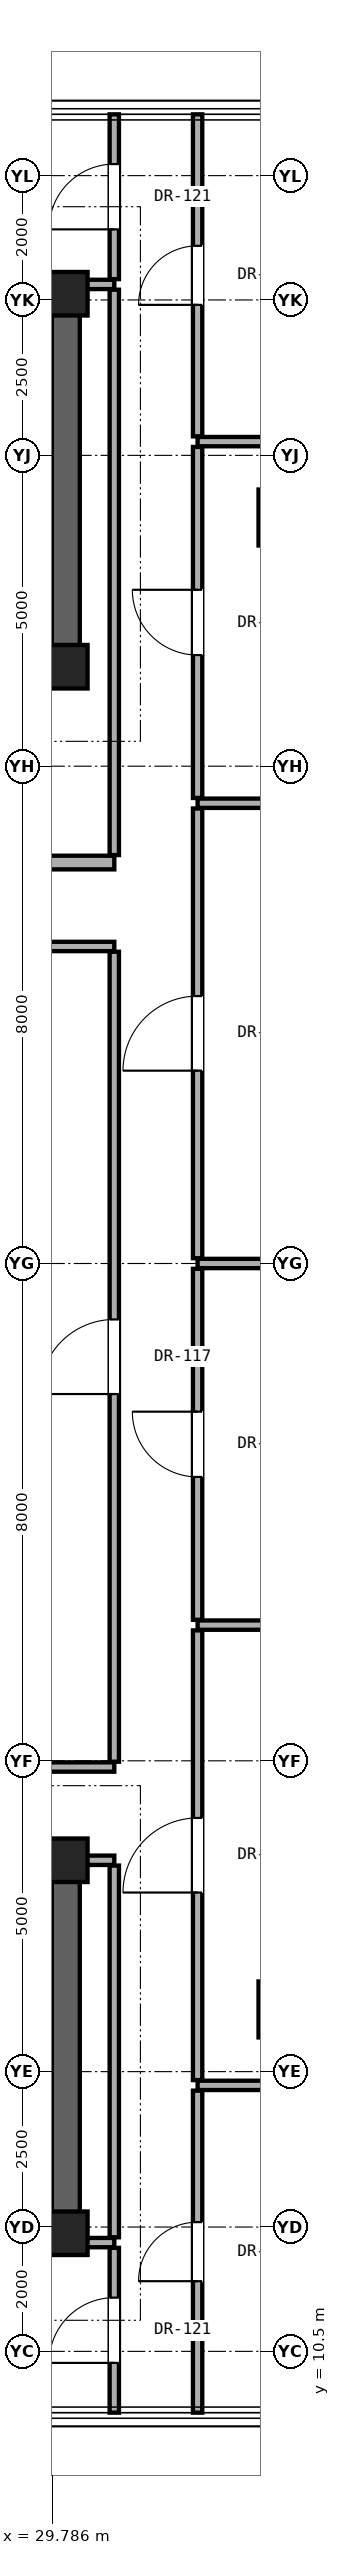
"""IFC4 building model, lengths in metres.
Left out: names, types, materials, properties, quantities, classifications, styles, units other than length and angle.
Written with IfcOpenShell. Run it as: python <this file> out.ifc"""

import sys

from ifc_helpers import new_model, si_unit, direction, frame, frame_2d, origin, origin_2d, place, context, subcontext, project, spatial, rectangle, extrude, element, fill, save


model = new_model("IFC4")
c1 = context("Model", 3, precision=1e-05, world=origin(), true_north=direction((0.0, 1.0)))
c2 = subcontext(c1, "Body", "Model", "MODEL_VIEW")
j1 = project(units=[si_unit("LENGTHUNIT", "METRE"), si_unit("PLANEANGLEUNIT", "RADIAN")], contexts=[c1])
p1 = place(None, origin())
s1 = spatial("IfcSite", under=j1, at=p1, CompositionType="ELEMENT")
p2 = place(p1, origin())
s2 = spatial("IfcBuilding", under=s1, at=p2, CompositionType="ELEMENT")
p3 = place(p2, frame((0.0, 0.0, 256.3)))
s3 = spatial("IfcBuildingStorey", under=s2, at=p3, CompositionType="ELEMENT", Elevation=256.3)
for number, where, z_axis, x_axis in (
    (1, (30.0, 12.4, 0.0), (0.0, 0.0, 1.0), (1.0, 0.0, 0.0)),
    (2, (30.0, 18.4, 0.0), (0.0, 0.0, 1.0), (1.0, 0.0, 0.0)),
    (3, (30.0, 37.6, 0.0), (0.0, 0.0, 1.0), (1.0, 0.0, 0.0)),
    (4, (30.0, 43.6, 0.0), (0.0, 0.0, 1.0), (1.0, 0.0, 0.0)),
):
    element("IfcColumn", number, at=place(p3, frame(where, z_axis=z_axis, x_axis=x_axis)), inside=s3, PredefinedType="COLUMN", context=c2, shape_type="SweptSolid", body=[
        extrude(rectangle(XDim=0.7, YDim=0.7, at=origin_2d()), origin(), (0.0, 0.0, 1.0), 3.6),
    ])
for number, where, z_axis, x_axis in (
    (5, (33.4, 16.0, 0.0), (0.0, 0.0, 1.0), (1.0, 0.0, 0.0)),
    (6, (33.4, 40.0, 0.0), (0.0, 0.0, 1.0), (1.0, 0.0, 0.0)),
):
    element("IfcColumn", number, at=place(p3, frame(where, z_axis=z_axis, x_axis=x_axis)), inside=s3, PredefinedType="PILASTER", context=c2, shape_type="SweptSolid", body=[
        extrude(rectangle(XDim=0.6, YDim=0.9, at=origin_2d()), origin(), (0.0, 0.0, 1.0), 3.6),
    ])
p4 = place(p3, frame((11.0, 43.6, 0.0), z_axis=(0.0, 0.0, 1.0), x_axis=(1.0, 0.0, 0.0)))
e7 = element("IfcWall", 7, at=p4, inside=s3, PredefinedType="SHEAR", context=c2, shape_type="SweptSolid", body=[
    extrude(rectangle(XDim=19.0, YDim=0.45, at=frame_2d((9.5, 0.0))), origin(), (0.0, 0.0, 1.0), 3.4),
])
p5 = place(p3, frame((30.0, 37.6, 0.0), z_axis=(0.0, 0.0, 1.0), x_axis=(0.0, 1.0, 0.0)))
e8 = element("IfcWall", 8, at=p5, inside=s3, PredefinedType="SHEAR", context=c2, shape_type="SweptSolid", body=[
    extrude(rectangle(XDim=6.0, YDim=0.45, at=frame_2d((3.0, 0.0))), origin(), (0.0, 0.0, 1.0), 3.4),
])
p6 = place(p3, frame((11.0, 37.6, 0.0), z_axis=(0.0, 0.0, 1.0), x_axis=(1.0, 0.0, 0.0)))
e9 = element("IfcWall", 9, at=p6, inside=s3, PredefinedType="SHEAR", context=c2, shape_type="SweptSolid", body=[
    extrude(rectangle(XDim=19.0, YDim=0.45, at=frame_2d((9.5, 0.0))), origin(), (0.0, 0.0, 1.0), 3.4),
])
p7 = place(p6, frame((1.06, 0.0, 0.0)))
e10 = element("IfcOpeningElement", 10, at=p7, cuts=e9, PredefinedType="OPENING", context=c2, shape_type="SweptSolid", body=[
    extrude(rectangle(XDim=1.15, YDim=2.2, at=frame_2d((0.575, 1.1))), frame((0.0, 0.235, 0.0), z_axis=(0.0, -1.0, 0.0), x_axis=(1.0, 0.0, 0.0)), (0.0, 0.0, 1.0), 0.47),
])
p8 = place(p6, frame((9.55, 0.0, 0.0)))
e11 = element("IfcOpeningElement", 11, at=p8, cuts=e9, PredefinedType="OPENING", context=c2, shape_type="SweptSolid", body=[
    extrude(rectangle(XDim=1.4, YDim=2.35, at=frame_2d((0.7, 1.175))), frame((0.0, 0.235, 0.0), z_axis=(0.0, -1.0, 0.0), x_axis=(1.0, 0.0, 0.0)), (0.0, 0.0, 1.0), 0.47),
])
p9 = place(p6, frame((11.95, 0.0, 0.0)))
e12 = element("IfcOpeningElement", 12, at=p9, cuts=e9, PredefinedType="OPENING", context=c2, shape_type="SweptSolid", body=[
    extrude(rectangle(XDim=1.4, YDim=2.35, at=frame_2d((0.7, 1.175))), frame((0.0, 0.235, 0.0), z_axis=(0.0, -1.0, 0.0), x_axis=(1.0, 0.0, 0.0)), (0.0, 0.0, 1.0), 0.47),
])
p10 = place(p3, frame((11.0, 12.4, 0.0), z_axis=(0.0, 0.0, 1.0), x_axis=(1.0, 0.0, 0.0)))
e13 = element("IfcWall", 13, at=p10, inside=s3, PredefinedType="SHEAR", context=c2, shape_type="SweptSolid", body=[
    extrude(rectangle(XDim=19.0, YDim=0.45, at=frame_2d((9.5, 0.0))), origin(), (0.0, 0.0, 1.0), 3.4),
])
p11 = place(p3, frame((30.0, 12.4, 0.0), z_axis=(0.0, 0.0, 1.0), x_axis=(0.0, 1.0, 0.0)))
e14 = element("IfcWall", 14, at=p11, inside=s3, PredefinedType="SHEAR", context=c2, shape_type="SweptSolid", body=[
    extrude(rectangle(XDim=6.0, YDim=0.45, at=frame_2d((3.0, 0.0))), origin(), (0.0, 0.0, 1.0), 3.4),
])
p12 = place(p3, frame((11.0, 18.4, 0.0), z_axis=(0.0, 0.0, 1.0), x_axis=(1.0, 0.0, 0.0)))
e15 = element("IfcWall", 15, at=p12, inside=s3, PredefinedType="SHEAR", context=c2, shape_type="SweptSolid", body=[
    extrude(rectangle(XDim=19.0, YDim=0.45, at=frame_2d((9.5, 0.0))), origin(), (0.0, 0.0, 1.0), 3.4),
])
p13 = place(p12, frame((4.175, 0.0, 0.0)))
e16 = element("IfcOpeningElement", 16, at=p13, cuts=e15, PredefinedType="OPENING", context=c2, shape_type="SweptSolid", body=[
    extrude(rectangle(XDim=1.2, YDim=2.25, at=frame_2d((0.6, 1.125))), frame((0.0, 0.235, 0.0), z_axis=(0.0, -1.0, 0.0), x_axis=(1.0, 0.0, 0.0)), (0.0, 0.0, 1.0), 0.47),
])
p14 = place(p12, frame((11.075, 0.0, 0.0)))
e17 = element("IfcOpeningElement", 17, at=p14, cuts=e15, PredefinedType="OPENING", context=c2, shape_type="SweptSolid", body=[
    extrude(rectangle(XDim=0.95, YDim=2.15, at=frame_2d((0.475, 1.075))), frame((0.0, 0.235, 0.0), z_axis=(0.0, -1.0, 0.0), x_axis=(1.0, 0.0, 0.0)), (0.0, 0.0, 1.0), 0.47),
])
p15 = place(p12, frame((14.3, 0.0, 0.0)))
e18 = element("IfcOpeningElement", 18, at=p15, cuts=e15, PredefinedType="OPENING", context=c2, shape_type="SweptSolid", body=[
    extrude(rectangle(XDim=1.3, YDim=2.3, at=frame_2d((0.65, 1.15))), frame((0.0, 0.235, 0.0), z_axis=(0.0, -1.0, 0.0), x_axis=(1.0, 0.0, 0.0)), (0.0, 0.0, 1.0), 0.47),
])
p16 = place(p12, frame((16.6, 0.0, 0.0)))
e19 = element("IfcOpeningElement", 19, at=p16, cuts=e15, PredefinedType="OPENING", context=c2, shape_type="SweptSolid", body=[
    extrude(rectangle(XDim=1.3, YDim=2.3, at=frame_2d((0.65, 1.15))), frame((0.0, 0.235, 0.0), z_axis=(0.0, -1.0, 0.0), x_axis=(1.0, 0.0, 0.0)), (0.0, 0.0, 1.0), 0.47),
])
p17 = place(p3, frame((30.22, 12.25, 0.0), z_axis=(0.0, 0.0, 1.0), x_axis=(1.0, 0.0, 0.0)))
e20 = element("IfcWall", 20, at=p17, inside=s3, PredefinedType="PARTITIONING", context=c2, shape_type="SweptSolid", body=[
    extrude(rectangle(XDim=0.56, YDim=0.15, at=frame_2d((0.28, 0.0))), origin(), (0.0, 0.0, 1.0), 3.4),
])
p18 = place(p3, frame((32.12, 14.779, 0.0), z_axis=(0.0, 0.0, 1.0), x_axis=(1.0, 0.0, 0.0)))
e21 = element("IfcWall", 21, at=p18, inside=s3, PredefinedType="PARTITIONING", context=c2, shape_type="SweptSolid", body=[
    extrude(rectangle(XDim=3.485, YDim=0.15, at=frame_2d((1.742, 0.0))), origin(), (0.0, 0.0, 1.0), 3.4),
])
p19 = place(p3, frame((30.22, 18.4, 0.0), z_axis=(0.0, 0.0, 1.0), x_axis=(1.0, 0.0, 0.0)))
e22 = element("IfcWall", 22, at=p19, inside=s3, PredefinedType="PARTITIONING", context=c2, shape_type="SweptSolid", body=[
    extrude(rectangle(XDim=0.56, YDim=0.15, at=frame_2d((0.28, 0.0))), origin(), (0.0, 0.0, 1.0), 2.792),
])
p20 = place(p3, frame((10.22, 19.9, 0.0), z_axis=(0.0, 0.0, 1.0), x_axis=(1.0, 0.0, 0.0)))
e23 = element("IfcWall", 23, at=p20, inside=s3, PredefinedType="PARTITIONING", context=c2, shape_type="SweptSolid", body=[
    extrude(rectangle(XDim=20.56, YDim=0.15, at=frame_2d((10.28, 0.0))), origin(), (0.0, 0.0, 1.0), 2.536),
])
p21 = place(p20, frame((1.36, 0.0, 0.0)))
e24 = element("IfcOpeningElement", 24, at=p21, cuts=e23, PredefinedType="OPENING", context=c2, shape_type="SweptSolid", body=[
    extrude(rectangle(XDim=0.9, YDim=2.1, at=frame_2d((0.45, 1.05))), frame((0.0, 0.085, 0.0), z_axis=(0.0, -1.0, 0.0), x_axis=(1.0, 0.0, 0.0)), (0.0, 0.0, 1.0), 0.17),
])
p22 = place(p20, frame((9.68, 0.0, 0.0)))
e25 = element("IfcOpeningElement", 25, at=p22, cuts=e23, PredefinedType="OPENING", context=c2, shape_type="SweptSolid", body=[
    extrude(rectangle(XDim=1.2, YDim=2.25, at=frame_2d((0.6, 1.125))), frame((0.0, 0.085, 0.0), z_axis=(0.0, -1.0, 0.0), x_axis=(1.0, 0.0, 0.0)), (0.0, 0.0, 1.0), 0.17),
])
for number, where, z_axis, x_axis in (
    (26, (32.12, 22.183, 0.0), (0.0, 0.0, 1.0), (1.0, 0.0, 0.0)),
    (27, (32.12, 28.0, 0.0), (0.0, 0.0, 1.0), (1.0, 0.0, 0.0)),
):
    element("IfcWall", number, at=place(p3, frame(where, z_axis=z_axis, x_axis=x_axis)), inside=s3, PredefinedType="PARTITIONING", context=c2, shape_type="SweptSolid", body=[
        extrude(rectangle(XDim=8.77, YDim=0.15, at=frame_2d((4.385, 0.0))), origin(), (0.0, 0.0, 1.0), 2.619),
    ])
p23 = place(p3, frame((10.22, 33.1, 0.0), z_axis=(0.0, 0.0, 1.0), x_axis=(1.0, 0.0, 0.0)))
e28 = element("IfcWall", 28, at=p23, inside=s3, PredefinedType="PARTITIONING", context=c2, shape_type="SweptSolid", body=[
    extrude(rectangle(XDim=20.56, YDim=0.15, at=frame_2d((10.28, 0.0))), origin(), (0.0, 0.0, 1.0), 2.536),
])
p24 = place(p3, frame((15.59, 34.45, 0.0), z_axis=(0.0, 0.0, 1.0), x_axis=(1.0, 0.0, 0.0)))
e29 = element("IfcWall", 29, at=p24, inside=s3, PredefinedType="SOLIDWALL", context=c2, shape_type="SweptSolid", body=[
    extrude(rectangle(XDim=15.19, YDim=0.22, at=frame_2d((7.595, 0.0))), origin(), (0.0, 0.0, 1.0), 2.536),
])
p25 = place(p24, frame((6.26, 0.0, 0.0)))
e30 = element("IfcOpeningElement", 30, at=p25, cuts=e29, PredefinedType="OPENING", context=c2, shape_type="SweptSolid", body=[
    extrude(rectangle(XDim=1.2, YDim=2.25, at=frame_2d((0.6, 1.125))), frame((0.0, 0.12, 0.0), z_axis=(0.0, -1.0, 0.0), x_axis=(1.0, 0.0, 0.0)), (0.0, 0.0, 1.0), 0.24),
])
p26 = place(p24, frame((9.96, 0.0, 0.0)))
e31 = element("IfcOpeningElement", 31, at=p26, cuts=e29, PredefinedType="OPENING", context=c2, shape_type="SweptSolid", body=[
    extrude(rectangle(XDim=0.95, YDim=2.15, at=frame_2d((0.475, 1.075))), frame((0.0, 0.12, 0.0), z_axis=(0.0, -1.0, 0.0), x_axis=(1.0, 0.0, 0.0)), (0.0, 0.0, 1.0), 0.24),
])
p27 = place(p24, frame((12.21, 0.0, 0.0)))
e32 = element("IfcOpeningElement", 32, at=p27, cuts=e29, PredefinedType="OPENING", context=c2, shape_type="SweptSolid", body=[
    extrude(rectangle(XDim=0.95, YDim=2.15, at=frame_2d((0.475, 1.075))), frame((0.0, 0.12, 0.0), z_axis=(0.0, -1.0, 0.0), x_axis=(1.0, 0.0, 0.0)), (0.0, 0.0, 1.0), 0.24),
])
p28 = place(p24, frame((0.675, 0.0, 0.0)))
e33 = element("IfcOpeningElement", 33, at=p28, cuts=e29, PredefinedType="OPENING", context=c2, shape_type="SweptSolid", body=[
    extrude(rectangle(XDim=0.85, YDim=2.01, at=frame_2d((0.425, 1.005))), frame((0.0, 0.12, 0.0), z_axis=(0.0, -1.0, 0.0), x_axis=(1.0, 0.0, 0.0)), (0.0, 0.0, 1.0), 0.24),
])
p29 = place(p24, frame((2.835, 0.0, 0.0)))
e34 = element("IfcOpeningElement", 34, at=p29, cuts=e29, PredefinedType="OPENING", context=c2, shape_type="SweptSolid", body=[
    extrude(rectangle(XDim=0.85, YDim=2.01, at=frame_2d((0.425, 1.005))), frame((0.0, 0.12, 0.0), z_axis=(0.0, -1.0, 0.0), x_axis=(1.0, 0.0, 0.0)), (0.0, 0.0, 1.0), 0.24),
])
p30 = place(p3, frame((32.12, 35.404, 0.0), z_axis=(0.0, 0.0, 1.0), x_axis=(1.0, 0.0, 0.0)))
e35 = element("IfcWall", 35, at=p30, inside=s3, PredefinedType="PARTITIONING", context=c2, shape_type="SweptSolid", body=[
    extrude(rectangle(XDim=8.77, YDim=0.15, at=frame_2d((4.385, 0.0))), origin(), (0.0, 0.0, 1.0), 2.619),
])
p31 = place(p3, frame((32.12, 41.221, 0.0), z_axis=(0.0, 0.0, 1.0), x_axis=(1.0, 0.0, 0.0)))
e36 = element("IfcWall", 36, at=p31, inside=s3, PredefinedType="PARTITIONING", context=c2, shape_type="SweptSolid", body=[
    extrude(rectangle(XDim=3.485, YDim=0.15, at=frame_2d((1.742, 0.0))), origin(), (0.0, 0.0, 1.0), 3.4),
])
p32 = place(p3, frame((30.22, 43.75, 0.0), z_axis=(0.0, 0.0, 1.0), x_axis=(1.0, 0.0, 0.0)))
e37 = element("IfcWall", 37, at=p32, inside=s3, PredefinedType="PARTITIONING", context=c2, shape_type="SweptSolid", body=[
    extrude(rectangle(XDim=0.56, YDim=0.15, at=frame_2d((0.28, 0.0))), origin(), (0.0, 0.0, 1.0), 3.4),
])
p33 = place(p3, frame((30.78, 9.514, 0.0), z_axis=(0.0, 0.0, 1.0), x_axis=(0.0, 1.0, 0.0)))
e38 = element("IfcWall", 38, at=p33, inside=s3, PredefinedType="PARTITIONING", context=c2, shape_type="SweptSolid", body=[
    extrude(rectangle(XDim=2.651, YDim=0.15, at=frame_2d((1.326, 0.0))), origin(), (0.0, 0.0, 1.0), 3.4),
])
p34 = place(p33, frame((0.801, 0.0, 0.0)))
e39 = element("IfcOpeningElement", 39, at=p34, cuts=e38, PredefinedType="OPENING", context=c2, shape_type="SweptSolid", body=[
    extrude(rectangle(XDim=1.05, YDim=2.2, at=frame_2d((0.525, 1.1))), frame((0.0, 0.085, 0.0), z_axis=(0.0, -1.0, 0.0), x_axis=(1.0, 0.0, 0.0)), (0.0, 0.0, 1.0), 0.17),
])
p35 = place(p3, frame((30.78, 12.335, 0.0), z_axis=(0.0, 0.0, 1.0), x_axis=(0.0, 1.0, 0.0)))
e40 = element("IfcWall", 40, at=p35, inside=s3, PredefinedType="PARTITIONING", context=c2, shape_type="SweptSolid", body=[
    extrude(rectangle(XDim=5.98, YDim=0.15, at=frame_2d((2.99, 0.0))), origin(), (0.0, 0.0, 1.0), 2.792),
])
p36 = place(p3, frame((30.78, 19.985, 0.0), z_axis=(0.0, 0.0, 1.0), x_axis=(0.0, 1.0, 0.0)))
e41 = element("IfcWall", 41, at=p36, inside=s3, PredefinedType="PARTITIONING", context=c2, shape_type="SweptSolid", body=[
    extrude(rectangle(XDim=13.03, YDim=0.15, at=frame_2d((6.515, 0.0))), origin(), (0.0, 0.0, 1.0), 2.696),
])
p37 = place(p36, frame((5.915, 0.0, 0.0)))
e42 = element("IfcOpeningElement", 42, at=p37, cuts=e41, PredefinedType="OPENING", context=c2, shape_type="SweptSolid", body=[
    extrude(rectangle(XDim=1.2, YDim=2.25, at=frame_2d((0.6, 1.125))), frame((0.0, 0.085, 0.0), z_axis=(0.0, -1.0, 0.0), x_axis=(1.0, 0.0, 0.0)), (0.0, 0.0, 1.0), 0.17),
])
p38 = place(p3, frame((30.78, 34.57, 0.0), z_axis=(0.0, 0.0, 1.0), x_axis=(0.0, 1.0, 0.0)))
e43 = element("IfcWall", 43, at=p38, inside=s3, PredefinedType="PARTITIONING", context=c2, shape_type="SweptSolid", body=[
    extrude(rectangle(XDim=9.095, YDim=0.15, at=frame_2d((4.547, 0.0))), origin(), (0.0, 0.0, 1.0), 2.792),
])
p39 = place(p3, frame((30.78, 43.835, 0.0), z_axis=(0.0, 0.0, 1.0), x_axis=(0.0, 1.0, 0.0)))
e44 = element("IfcWall", 44, at=p39, inside=s3, PredefinedType="PARTITIONING", context=c2, shape_type="SweptSolid", body=[
    extrude(rectangle(XDim=2.651, YDim=0.15, at=frame_2d((1.326, 0.0))), origin(), (0.0, 0.0, 1.0), 3.4),
])
p40 = place(p39, frame((0.801, 0.0, 0.0)))
e45 = element("IfcOpeningElement", 45, at=p40, cuts=e44, PredefinedType="OPENING", context=c2, shape_type="SweptSolid", body=[
    extrude(rectangle(XDim=1.05, YDim=2.2, at=frame_2d((0.525, 1.1))), frame((0.0, 0.085, 0.0), z_axis=(0.0, -1.0, 0.0), x_axis=(1.0, 0.0, 0.0)), (0.0, 0.0, 1.0), 0.17),
])
p41 = place(p3, frame((32.12, 9.514, 0.0), z_axis=(0.0, 0.0, 1.0), x_axis=(0.0, 1.0, 0.0)))
e46 = element("IfcWall", 46, at=p41, inside=s3, PredefinedType="PARTITIONING", context=c2, shape_type="SweptSolid", body=[
    extrude(rectangle(XDim=5.18, YDim=0.15, at=frame_2d((2.59, 0.0))), origin(), (0.0, 0.0, 1.0), 3.4),
])
p42 = place(p41, frame((2.115, 0.0, 0.0)))
e47 = element("IfcOpeningElement", 47, at=p42, cuts=e46, PredefinedType="OPENING", context=c2, shape_type="SweptSolid", body=[
    extrude(rectangle(XDim=0.95, YDim=2.15, at=frame_2d((0.475, 1.075))), frame((0.0, 0.085, 0.0), z_axis=(0.0, -1.0, 0.0), x_axis=(1.0, 0.0, 0.0)), (0.0, 0.0, 1.0), 0.17),
])
p43 = place(p3, frame((32.12, 14.864, 0.0), z_axis=(0.0, 0.0, 1.0), x_axis=(0.0, 1.0, 0.0)))
e48 = element("IfcWall", 48, at=p43, inside=s3, PredefinedType="PARTITIONING", context=c2, shape_type="SweptSolid", body=[
    extrude(rectangle(XDim=7.234, YDim=0.15, at=frame_2d((3.617, 0.0))), origin(), (0.0, 0.0, 1.0), 2.792),
])
p44 = place(p43, frame((3.017, 0.0, 0.0)))
e49 = element("IfcOpeningElement", 49, at=p44, cuts=e48, PredefinedType="OPENING", context=c2, shape_type="SweptSolid", body=[
    extrude(rectangle(XDim=1.2, YDim=2.25, at=frame_2d((0.6, 1.125))), frame((0.0, 0.085, 0.0), z_axis=(0.0, -1.0, 0.0), x_axis=(1.0, 0.0, 0.0)), (0.0, 0.0, 1.0), 0.17),
])
p45 = place(p3, frame((32.12, 22.268, 0.0), z_axis=(0.0, 0.0, 1.0), x_axis=(0.0, 1.0, 0.0)))
e50 = element("IfcWall", 50, at=p45, inside=s3, PredefinedType="PARTITIONING", context=c2, shape_type="SweptSolid", body=[
    extrude(rectangle(XDim=5.647, YDim=0.15, at=frame_2d((2.823, 0.0))), origin(), (0.0, 0.0, 1.0), 2.696),
])
p46 = place(p45, frame((2.299, 0.0, 0.0)))
e51 = element("IfcOpeningElement", 51, at=p46, cuts=e50, PredefinedType="OPENING", context=c2, shape_type="SweptSolid", body=[
    extrude(rectangle(XDim=1.05, YDim=2.2, at=frame_2d((0.525, 1.1))), frame((0.0, 0.085, 0.0), z_axis=(0.0, -1.0, 0.0), x_axis=(1.0, 0.0, 0.0)), (0.0, 0.0, 1.0), 0.17),
])
p47 = place(p3, frame((32.12, 28.085, 0.0), z_axis=(0.0, 0.0, 1.0), x_axis=(0.0, 1.0, 0.0)))
e52 = element("IfcWall", 52, at=p47, inside=s3, PredefinedType="PARTITIONING", context=c2, shape_type="SweptSolid", body=[
    extrude(rectangle(XDim=7.234, YDim=0.15, at=frame_2d((3.617, 0.0))), origin(), (0.0, 0.0, 1.0), 2.696),
])
p48 = place(p47, frame((3.017, 0.0, 0.0)))
e53 = element("IfcOpeningElement", 53, at=p48, cuts=e52, PredefinedType="OPENING", context=c2, shape_type="SweptSolid", body=[
    extrude(rectangle(XDim=1.2, YDim=2.25, at=frame_2d((0.6, 1.125))), frame((0.0, 0.085, 0.0), z_axis=(0.0, -1.0, 0.0), x_axis=(1.0, 0.0, 0.0)), (0.0, 0.0, 1.0), 0.17),
])
p49 = place(p3, frame((32.12, 35.489, 0.0), z_axis=(0.0, 0.0, 1.0), x_axis=(0.0, 1.0, 0.0)))
e54 = element("IfcWall", 54, at=p49, inside=s3, PredefinedType="PARTITIONING", context=c2, shape_type="SweptSolid", body=[
    extrude(rectangle(XDim=5.647, YDim=0.15, at=frame_2d((2.823, 0.0))), origin(), (0.0, 0.0, 1.0), 2.792),
])
p50 = place(p49, frame((2.299, 0.0, 0.0)))
e55 = element("IfcOpeningElement", 55, at=p50, cuts=e54, PredefinedType="OPENING", context=c2, shape_type="SweptSolid", body=[
    extrude(rectangle(XDim=1.05, YDim=2.2, at=frame_2d((0.525, 1.1))), frame((0.0, 0.085, 0.0), z_axis=(0.0, -1.0, 0.0), x_axis=(1.0, 0.0, 0.0)), (0.0, 0.0, 1.0), 0.17),
])
p51 = place(p3, frame((32.12, 41.306, 0.0), z_axis=(0.0, 0.0, 1.0), x_axis=(0.0, 1.0, 0.0)))
e56 = element("IfcWall", 56, at=p51, inside=s3, PredefinedType="PARTITIONING", context=c2, shape_type="SweptSolid", body=[
    extrude(rectangle(XDim=5.18, YDim=0.15, at=frame_2d((2.59, 0.0))), origin(), (0.0, 0.0, 1.0), 3.4),
])
p52 = place(p51, frame((2.115, 0.0, 0.0)))
e57 = element("IfcOpeningElement", 57, at=p52, cuts=e56, PredefinedType="OPENING", context=c2, shape_type="SweptSolid", body=[
    extrude(rectangle(XDim=0.95, YDim=2.15, at=frame_2d((0.475, 1.075))), frame((0.0, 0.085, 0.0), z_axis=(0.0, -1.0, 0.0), x_axis=(1.0, 0.0, 0.0)), (0.0, 0.0, 1.0), 0.17),
])
p53 = place(p44, origin())
e58 = element("IfcDoor", 58, at=p53, inside=s3, OperationType="SINGLE_SWING_LEFT", PredefinedType="DOOR", context=c2, shape_type="SweptSolid", body=[
    extrude(rectangle(XDim=1.2, YDim=2.25, at=frame_2d((0.6, 1.125))), frame((0.0, 0.025, 0.0), z_axis=(0.0, -1.0, 0.0), x_axis=(1.0, 0.0, 0.0)), (0.0, 0.0, 1.0), 0.05),
])
fill(e49, e58)
p54 = place(p46, origin())
e59 = element("IfcDoor", 59, at=p54, inside=s3, OperationType="SINGLE_SWING_RIGHT", PredefinedType="DOOR", context=c2, shape_type="SweptSolid", body=[
    extrude(rectangle(XDim=1.05, YDim=2.2, at=frame_2d((0.525, 1.1))), frame((0.0, 0.025, 0.0), z_axis=(0.0, -1.0, 0.0), x_axis=(1.0, 0.0, 0.0)), (0.0, 0.0, 1.0), 0.05),
])
fill(e51, e59)
p55 = place(p48, origin())
e60 = element("IfcDoor", 60, at=p55, inside=s3, OperationType="SINGLE_SWING_LEFT", PredefinedType="DOOR", context=c2, shape_type="SweptSolid", body=[
    extrude(rectangle(XDim=1.2, YDim=2.25, at=frame_2d((0.6, 1.125))), frame((0.0, 0.025, 0.0), z_axis=(0.0, -1.0, 0.0), x_axis=(1.0, 0.0, 0.0)), (0.0, 0.0, 1.0), 0.05),
])
fill(e53, e60)
p56 = place(p50, origin())
e61 = element("IfcDoor", 61, at=p56, inside=s3, OperationType="SINGLE_SWING_RIGHT", PredefinedType="DOOR", context=c2, shape_type="SweptSolid", body=[
    extrude(rectangle(XDim=1.05, YDim=2.2, at=frame_2d((0.525, 1.1))), frame((0.0, 0.025, 0.0), z_axis=(0.0, -1.0, 0.0), x_axis=(1.0, 0.0, 0.0)), (0.0, 0.0, 1.0), 0.05),
])
fill(e55, e61)
p57 = place(p37, origin())
e62 = element("IfcDoor", 62, at=p57, inside=s3, OperationType="SINGLE_SWING_LEFT", PredefinedType="DOOR", context=c2, shape_type="SweptSolid", body=[
    extrude(rectangle(XDim=1.2, YDim=2.25, at=frame_2d((0.6, 1.125))), frame((0.0, 0.025, 0.0), z_axis=(0.0, -1.0, 0.0), x_axis=(1.0, 0.0, 0.0)), (0.0, 0.0, 1.0), 0.05),
])
fill(e42, e62)
p58 = place(p34, origin())
e63 = element("IfcDoor", 63, at=p58, inside=s3, OperationType="SINGLE_SWING_LEFT", PredefinedType="DOOR", context=c2, shape_type="SweptSolid", body=[
    extrude(rectangle(XDim=1.05, YDim=2.2, at=frame_2d((0.525, 1.1))), frame((0.0, 0.025, 0.0), z_axis=(0.0, -1.0, 0.0), x_axis=(1.0, 0.0, 0.0)), (0.0, 0.0, 1.0), 0.05),
])
fill(e39, e63)
p59 = place(p42, origin())
e64 = element("IfcDoor", 64, at=p59, inside=s3, OperationType="SINGLE_SWING_LEFT", PredefinedType="DOOR", context=c2, shape_type="SweptSolid", body=[
    extrude(rectangle(XDim=0.95, YDim=2.15, at=frame_2d((0.475, 1.075))), frame((0.0, 0.025, 0.0), z_axis=(0.0, -1.0, 0.0), x_axis=(1.0, 0.0, 0.0)), (0.0, 0.0, 1.0), 0.05),
])
fill(e47, e64)
p60 = place(p40, origin())
e65 = element("IfcDoor", 65, at=p60, inside=s3, OperationType="SINGLE_SWING_LEFT", PredefinedType="DOOR", context=c2, shape_type="SweptSolid", body=[
    extrude(rectangle(XDim=1.05, YDim=2.2, at=frame_2d((0.525, 1.1))), frame((0.0, 0.025, 0.0), z_axis=(0.0, -1.0, 0.0), x_axis=(1.0, 0.0, 0.0)), (0.0, 0.0, 1.0), 0.05),
])
fill(e45, e65)
p61 = place(p52, origin())
e66 = element("IfcDoor", 66, at=p61, inside=s3, OperationType="SINGLE_SWING_LEFT", PredefinedType="DOOR", context=c2, shape_type="SweptSolid", body=[
    extrude(rectangle(XDim=0.95, YDim=2.15, at=frame_2d((0.475, 1.075))), frame((0.0, 0.025, 0.0), z_axis=(0.0, -1.0, 0.0), x_axis=(1.0, 0.0, 0.0)), (0.0, 0.0, 1.0), 0.05),
])
fill(e57, e66)
save(model, sys.argv[1])
